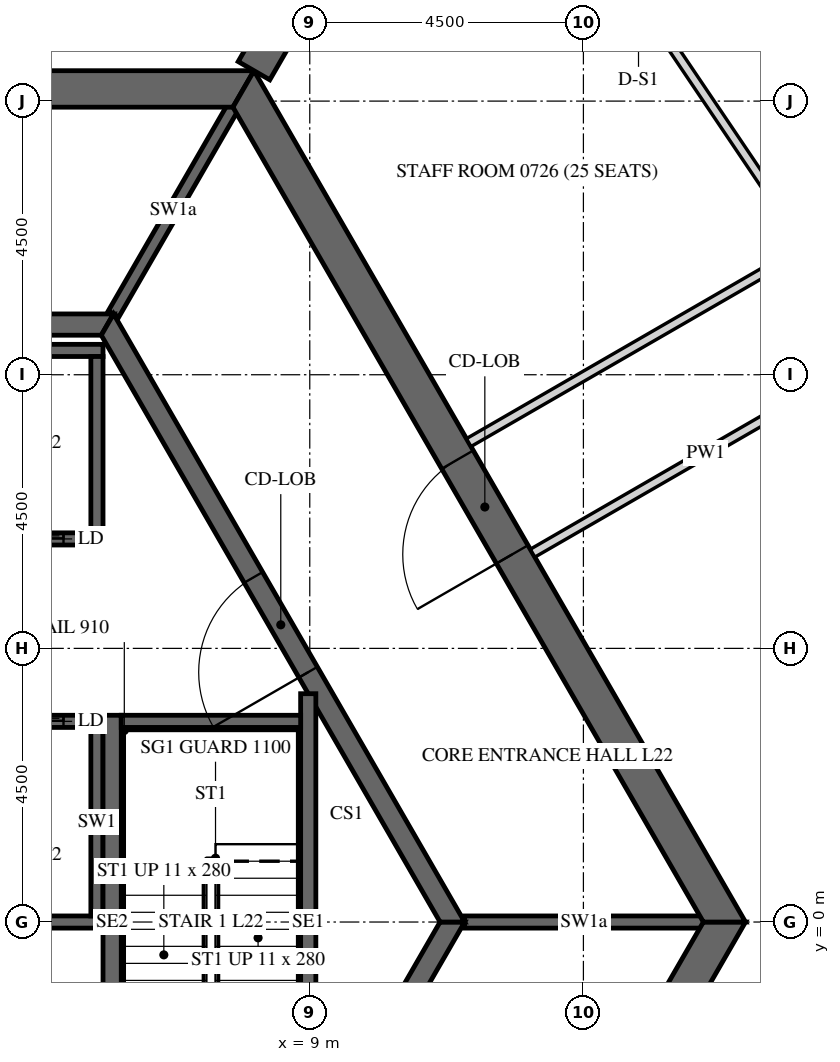
"""IFC4 building model, lengths in metres.
Left out: names, types, materials, properties, quantities, classifications, styles, units other than length and angle.
Written with IfcOpenShell. Run it as: python <this file> out.ifc"""

import sys

from ifc_helpers import new_model, si_unit, direction, frame, frame_2d, origin, place, context, subcontext, project, spatial, polyline, rectangle, outline, extrude, element, fill, save


model = new_model("IFC4")
c1 = context("Model", 3, precision=1e-05, world=origin(), true_north=direction((0.0, 1.0)))
c2 = subcontext(c1, "Body", "Model", "MODEL_VIEW")
j1 = project(units=[si_unit("LENGTHUNIT", "METRE"), si_unit("PLANEANGLEUNIT", "RADIAN")], contexts=[c1])
p1 = place(None, origin())
s1 = spatial("IfcSite", under=j1, at=p1, CompositionType="ELEMENT")
p2 = place(p1, origin())
s2 = spatial("IfcBuilding", under=s1, at=p2, CompositionType="ELEMENT")
p3 = place(p2, frame((0.0, 0.0, 99.9)))
s3 = spatial("IfcBuildingStorey", under=s2, at=p3, CompositionType="ELEMENT", Elevation=99.9)
p4 = place(p3, frame((7.91, -13.7, -0.15), z_axis=(0.0, 0.0, 1.0), x_axis=(0.499999880136, 0.866025472988, 0.0)))
e1 = element("IfcWall", 1, at=p4, inside=s3, PredefinedType="SHEAR", context=c2, shape_type="SweptSolid", body=[
    extrude(outline(polyline([(-0.173, -0.3), (15.993, -0.3), (15.646, 0.3), (0.173, 0.3), (-0.173, -0.3)])), origin(), (0.0, 0.0, 1.0), 3.9),
])
p5 = place(p4, frame((7.039, 0.0, 0.15)))
e2 = element("IfcOpeningElement", 2, at=p5, cuts=e1, PredefinedType="OPENING", context=c2, shape_type="SweptSolid", body=[
    extrude(rectangle(XDim=1.8, YDim=2.4, at=frame_2d((0.9, 1.2))), frame((0.0, 0.31, 0.0), z_axis=(0.0, -1.0, 0.0), x_axis=(1.0, 0.0, 0.0)), (0.0, 0.0, 1.0), 0.62),
])
p6 = place(p3, frame((15.819, 0.0, -0.15), z_axis=(0.0, 0.0, 1.0), x_axis=(-0.499999880136, 0.866025472988, 0.0)))
e3 = element("IfcWall", 3, at=p6, inside=s3, PredefinedType="SHEAR", context=c2, shape_type="SweptSolid", body=[
    extrude(outline(polyline([(-0.173, -0.3), (15.993, -0.3), (15.646, 0.3), (0.173, 0.3), (-0.173, -0.3)])), origin(), (0.0, 0.0, 1.0), 3.9),
])
p7 = place(p6, frame((6.981, 0.0, 0.15)))
e4 = element("IfcOpeningElement", 4, at=p7, cuts=e3, PredefinedType="OPENING", context=c2, shape_type="SweptSolid", body=[
    extrude(rectangle(XDim=1.8, YDim=2.4, at=frame_2d((0.9, 1.2))), frame((0.0, 0.31, 0.0), z_axis=(0.0, -1.0, 0.0), x_axis=(1.0, 0.0, 0.0)), (0.0, 0.0, 1.0), 0.62),
])
p8 = place(p3, frame((7.91, 13.7, -0.15), z_axis=(0.0, 0.0, 1.0), x_axis=(-1.0, 0.0, 0.0)))
e5 = element("IfcWall", 5, at=p8, inside=s3, PredefinedType="SHEAR", context=c2, shape_type="SweptSolid", body=[
    extrude(outline(polyline([(-0.173, -0.3), (15.993, -0.3), (15.646, 0.3), (0.173, 0.3), (-0.173, -0.3)])), origin(), (0.0, 0.0, 1.0), 3.9),
])
p9 = place(p8, frame((7.31, 0.0, 0.15)))
e6 = element("IfcOpeningElement", 6, at=p9, cuts=e5, PredefinedType="OPENING", context=c2, shape_type="SweptSolid", body=[
    extrude(rectangle(XDim=1.2, YDim=2.4, at=frame_2d((0.6, 1.2))), frame((0.0, 0.31, 0.0), z_axis=(0.0, -1.0, 0.0), x_axis=(1.0, 0.0, 0.0)), (0.0, 0.0, 1.0), 0.62),
])
p10 = place(p3, frame((8.083, 14.0, -0.15), z_axis=(0.0, 0.0, 1.0), x_axis=(0.499997680643, 0.866026742862, 0.0)))
e7 = element("IfcWall", 7, at=p10, inside=s3, PredefinedType="SHEAR", context=c2, shape_type="SweptSolid", body=[
    extrude(rectangle(XDim=16.509, YDim=0.6, at=frame_2d((8.254, 0.0))), origin(), (0.0, 0.0, 1.0), 3.9),
])
p11 = place(p10, frame((7.354, 0.0, 0.15)))
e8 = element("IfcOpeningElement", 8, at=p11, cuts=e7, PredefinedType="OPENING", context=c2, shape_type="SweptSolid", body=[
    extrude(rectangle(XDim=1.8, YDim=2.4, at=frame_2d((0.9, 1.2))), frame((0.0, 0.31, 0.0), z_axis=(0.0, -1.0, 0.0), x_axis=(1.0, 0.0, 0.0)), (0.0, 0.0, 1.0), 0.62),
])
p12 = place(p3, frame((5.673, -9.825, -0.15), z_axis=(0.0, 0.0, 1.0), x_axis=(0.499995046907, 0.866028263435, 0.0)))
e9 = element("IfcWall", 9, at=p12, inside=s3, PredefinedType="SHEAR", context=c2, shape_type="SweptSolid", body=[
    extrude(outline(polyline([(-0.101, -0.175), (11.446, -0.175), (11.244, 0.175), (0.101, 0.175), (-0.101, -0.175)])), origin(), (0.0, 0.0, 1.0), 3.9),
])
p13 = place(p12, frame((4.801, 0.0, 0.15)))
e10 = element("IfcOpeningElement", 10, at=p13, cuts=e9, PredefinedType="OPENING", context=c2, shape_type="SweptSolid", body=[
    extrude(rectangle(XDim=1.8, YDim=2.4, at=frame_2d((0.9, 1.2))), frame((0.0, 0.185, 0.0), z_axis=(0.0, -1.0, 0.0), x_axis=(1.0, 0.0, 0.0)), (0.0, 0.0, 1.0), 0.37),
])
p14 = place(p3, frame((11.345, 0.0, -0.15), z_axis=(0.0, 0.0, 1.0), x_axis=(-0.499995046907, 0.866028263435, 0.0)))
e11 = element("IfcWall", 11, at=p14, inside=s3, PredefinedType="SHEAR", context=c2, shape_type="SweptSolid", body=[
    extrude(outline(polyline([(-0.101, -0.175), (11.446, -0.175), (11.244, 0.175), (0.101, 0.175), (-0.101, -0.175)])), origin(), (0.0, 0.0, 1.0), 3.9),
])
p15 = place(p14, frame((4.744, 0.0, 0.15)))
e12 = element("IfcOpeningElement", 12, at=p15, cuts=e11, PredefinedType="OPENING", context=c2, shape_type="SweptSolid", body=[
    extrude(rectangle(XDim=1.8, YDim=2.4, at=frame_2d((0.9, 1.2))), frame((0.0, 0.185, 0.0), z_axis=(0.0, -1.0, 0.0), x_axis=(1.0, 0.0, 0.0)), (0.0, 0.0, 1.0), 0.37),
])
p16 = place(p3, frame((5.673, 9.825, -0.15), z_axis=(0.0, 0.0, 1.0), x_axis=(-1.0, 0.0, 0.0)))
e13 = element("IfcWall", 13, at=p16, inside=s3, PredefinedType="SHEAR", context=c2, shape_type="SweptSolid", body=[
    extrude(outline(polyline([(-0.101, -0.175), (11.446, -0.175), (11.244, 0.175), (0.101, 0.175), (-0.101, -0.175)])), origin(), (0.0, 0.0, 1.0), 3.9),
])
p17 = place(p3, frame((-5.6, 6.3, -0.25), z_axis=(0.0, 0.0, 1.0), x_axis=(1.0, 0.0, 0.0)))
e14 = element("IfcWall", 14, at=p17, inside=s3, PredefinedType="SHEAR", context=c2, shape_type="SweptSolid", body=[
    extrude(rectangle(XDim=11.2, YDim=0.2, at=frame_2d((5.6, 0.0))), origin(), (0.0, 0.0, 1.0), 3.9),
])
p18 = place(p17, frame((0.65, 0.0, 0.25)))
e15 = element("IfcOpeningElement", 15, at=p18, cuts=e14, PredefinedType="OPENING", context=c2, shape_type="SweptSolid", body=[
    extrude(rectangle(XDim=1.1, YDim=2.1, at=frame_2d((0.55, 1.05))), frame((0.0, 0.11, 0.0), z_axis=(0.0, -1.0, 0.0), x_axis=(1.0, 0.0, 0.0)), (0.0, 0.0, 1.0), 0.22),
])
p19 = place(p17, frame((2.85, 0.0, 0.25)))
e16 = element("IfcOpeningElement", 16, at=p19, cuts=e14, PredefinedType="OPENING", context=c2, shape_type="SweptSolid", body=[
    extrude(rectangle(XDim=1.1, YDim=2.1, at=frame_2d((0.55, 1.05))), frame((0.0, 0.11, 0.0), z_axis=(0.0, -1.0, 0.0), x_axis=(1.0, 0.0, 0.0)), (0.0, 0.0, 1.0), 0.22),
])
p20 = place(p17, frame((5.05, 0.0, 0.25)))
e17 = element("IfcOpeningElement", 17, at=p20, cuts=e14, PredefinedType="OPENING", context=c2, shape_type="SweptSolid", body=[
    extrude(rectangle(XDim=1.1, YDim=2.1, at=frame_2d((0.55, 1.05))), frame((0.0, 0.11, 0.0), z_axis=(0.0, -1.0, 0.0), x_axis=(1.0, 0.0, 0.0)), (0.0, 0.0, 1.0), 0.22),
])
p21 = place(p17, frame((7.25, 0.0, 0.25)))
e18 = element("IfcOpeningElement", 18, at=p21, cuts=e14, PredefinedType="OPENING", context=c2, shape_type="SweptSolid", body=[
    extrude(rectangle(XDim=1.1, YDim=2.1, at=frame_2d((0.55, 1.05))), frame((0.0, 0.11, 0.0), z_axis=(0.0, -1.0, 0.0), x_axis=(1.0, 0.0, 0.0)), (0.0, 0.0, 1.0), 0.22),
])
p22 = place(p17, frame((9.45, 0.0, 0.25)))
e19 = element("IfcOpeningElement", 19, at=p22, cuts=e14, PredefinedType="OPENING", context=c2, shape_type="SweptSolid", body=[
    extrude(rectangle(XDim=1.1, YDim=2.1, at=frame_2d((0.55, 1.05))), frame((0.0, 0.11, 0.0), z_axis=(0.0, -1.0, 0.0), x_axis=(1.0, 0.0, 0.0)), (0.0, 0.0, 1.0), 0.22),
])
p23 = place(p3, frame((-5.6, 9.4, -0.25), z_axis=(0.0, 0.0, 1.0), x_axis=(1.0, 0.0, 0.0)))
e20 = element("IfcWall", 20, at=p23, inside=s3, PredefinedType="SHEAR", context=c2, shape_type="SweptSolid", body=[
    extrude(rectangle(XDim=11.2, YDim=0.2, at=frame_2d((5.6, 0.0))), origin(), (0.0, 0.0, 1.0), 3.9),
])
p24 = place(p3, frame((5.5, 6.4, -0.25), z_axis=(0.0, 0.0, 1.0), x_axis=(0.0, 1.0, 0.0)))
e21 = element("IfcWall", 21, at=p24, inside=s3, PredefinedType="SHEAR", context=c2, shape_type="SweptSolid", body=[
    extrude(rectangle(XDim=2.9, YDim=0.2, at=frame_2d((1.45, 0.0))), origin(), (0.0, 0.0, 1.0), 3.9),
])
p25 = place(p3, frame((-5.6, 3.3, -0.25), z_axis=(0.0, 0.0, 1.0), x_axis=(1.0, 0.0, 0.0)))
e22 = element("IfcWall", 22, at=p25, inside=s3, PredefinedType="SHEAR", context=c2, shape_type="SweptSolid", body=[
    extrude(rectangle(XDim=11.2, YDim=0.2, at=frame_2d((5.6, 0.0))), origin(), (0.0, 0.0, 1.0), 3.9),
])
p26 = place(p25, frame((0.65, 0.0, 0.25)))
e23 = element("IfcOpeningElement", 23, at=p26, cuts=e22, PredefinedType="OPENING", context=c2, shape_type="SweptSolid", body=[
    extrude(rectangle(XDim=1.1, YDim=2.1, at=frame_2d((0.55, 1.05))), frame((0.0, 0.11, 0.0), z_axis=(0.0, -1.0, 0.0), x_axis=(1.0, 0.0, 0.0)), (0.0, 0.0, 1.0), 0.22),
])
p27 = place(p25, frame((2.85, 0.0, 0.25)))
e24 = element("IfcOpeningElement", 24, at=p27, cuts=e22, PredefinedType="OPENING", context=c2, shape_type="SweptSolid", body=[
    extrude(rectangle(XDim=1.1, YDim=2.1, at=frame_2d((0.55, 1.05))), frame((0.0, 0.11, 0.0), z_axis=(0.0, -1.0, 0.0), x_axis=(1.0, 0.0, 0.0)), (0.0, 0.0, 1.0), 0.22),
])
p28 = place(p25, frame((5.05, 0.0, 0.25)))
e25 = element("IfcOpeningElement", 25, at=p28, cuts=e22, PredefinedType="OPENING", context=c2, shape_type="SweptSolid", body=[
    extrude(rectangle(XDim=1.1, YDim=2.1, at=frame_2d((0.55, 1.05))), frame((0.0, 0.11, 0.0), z_axis=(0.0, -1.0, 0.0), x_axis=(1.0, 0.0, 0.0)), (0.0, 0.0, 1.0), 0.22),
])
p29 = place(p25, frame((7.25, 0.0, 0.25)))
e26 = element("IfcOpeningElement", 26, at=p29, cuts=e22, PredefinedType="OPENING", context=c2, shape_type="SweptSolid", body=[
    extrude(rectangle(XDim=1.1, YDim=2.1, at=frame_2d((0.55, 1.05))), frame((0.0, 0.11, 0.0), z_axis=(0.0, -1.0, 0.0), x_axis=(1.0, 0.0, 0.0)), (0.0, 0.0, 1.0), 0.22),
])
p30 = place(p25, frame((9.45, 0.0, 0.25)))
e27 = element("IfcOpeningElement", 27, at=p30, cuts=e22, PredefinedType="OPENING", context=c2, shape_type="SweptSolid", body=[
    extrude(rectangle(XDim=1.1, YDim=2.1, at=frame_2d((0.55, 1.05))), frame((0.0, 0.11, 0.0), z_axis=(0.0, -1.0, 0.0), x_axis=(1.0, 0.0, 0.0)), (0.0, 0.0, 1.0), 0.22),
])
p31 = place(p3, frame((-5.6, 0.0, -0.25), z_axis=(0.0, 0.0, 1.0), x_axis=(1.0, 0.0, 0.0)))
e28 = element("IfcWall", 28, at=p31, inside=s3, PredefinedType="SHEAR", context=c2, shape_type="SweptSolid", body=[
    extrude(rectangle(XDim=11.2, YDim=0.2, at=frame_2d((5.6, 0.0))), origin(), (0.0, 0.0, 1.0), 3.9),
])
p32 = place(p3, frame((5.5, 0.1, -0.25), z_axis=(0.0, 0.0, 1.0), x_axis=(0.0, 1.0, 0.0)))
e29 = element("IfcWall", 29, at=p32, inside=s3, PredefinedType="SHEAR", context=c2, shape_type="SweptSolid", body=[
    extrude(rectangle(XDim=3.1, YDim=0.2, at=frame_2d((1.55, 0.0))), origin(), (0.0, 0.0, 1.0), 3.9),
])
p33 = place(p3, frame((11.547, 0.0, -0.15), z_axis=(0.0, 0.0, 1.0), x_axis=(1.0, 0.0, 0.0)))
e30 = element("IfcWall", 30, at=p33, inside=s3, PredefinedType="SHEAR", context=c2, shape_type="SweptSolid", body=[
    extrude(rectangle(XDim=3.926, YDim=0.2, at=frame_2d((1.963, 0.0))), origin(), (0.0, 0.0, 1.0), 3.9),
])
p34 = place(p3, frame((5.773, 10.0, -0.15), z_axis=(0.0, 0.0, 1.0), x_axis=(0.500038251005, 0.86600331843, 0.0)))
e31 = element("IfcWall", 31, at=p34, inside=s3, PredefinedType="SHEAR", context=c2, shape_type="SweptSolid", body=[
    extrude(rectangle(XDim=3.926, YDim=0.2, at=frame_2d((1.963, 0.0))), origin(), (0.0, 0.0, 1.0), 3.9),
])
p35 = place(p3, frame((5.75, -3.4, -0.25), z_axis=(0.0, 0.0, 1.0), x_axis=(0.0, 1.0, 0.0)))
e32 = element("IfcWall", 32, at=p35, inside=s3, PredefinedType="SHEAR", context=c2, shape_type="SweptSolid", body=[
    extrude(rectangle(XDim=6.8, YDim=0.3, at=frame_2d((3.4, 0.0))), origin(), (0.0, 0.0, 1.0), 3.9),
])
p36 = place(p3, frame((8.975, -3.755, -0.25), z_axis=(0.0, 0.0, 1.0), x_axis=(0.0, 1.0, 0.0)))
e33 = element("IfcWall", 33, at=p36, inside=s3, PredefinedType="SHEAR", context=c2, shape_type="SweptSolid", body=[
    extrude(rectangle(XDim=7.51, YDim=0.25, at=frame_2d((3.755, 0.0))), origin(), (0.0, 0.0, 1.0), 3.9),
])
p37 = place(p3, frame((5.9, 3.3, -0.25), z_axis=(0.0, 0.0, 1.0), x_axis=(1.0, 0.0, 0.0)))
e34 = element("IfcWall", 34, at=p37, inside=s3, PredefinedType="SHEAR", context=c2, shape_type="SweptSolid", body=[
    extrude(rectangle(XDim=2.95, YDim=0.2, at=frame_2d((1.475, 0.0))), origin(), (0.0, 0.0, 1.0), 3.9),
])
p38 = place(p3, frame((14.102, -20.075, 0.0), z_axis=(0.0, 0.0, 1.0), x_axis=(0.499996816197, 0.866027241946, 0.0)))
e35 = element("IfcWall", 35, at=p38, inside=s3, PredefinedType="PARTITIONING", context=c2, shape_type="SweptSolid", body=[
    extrude(rectangle(XDim=24.238, YDim=0.15, at=frame_2d((12.119, 0.0))), origin(), (0.0, 0.0, 1.0), 2.988),
])
p39 = place(p38, frame((4.729, 0.0, 0.0)))
e36 = element("IfcOpeningElement", 36, at=p39, cuts=e35, PredefinedType="OPENING", context=c2, shape_type="SweptSolid", body=[
    extrude(rectangle(XDim=1.0, YDim=2.1, at=frame_2d((0.5, 1.05))), frame((0.0, 0.085, 0.0), z_axis=(0.0, -1.0, 0.0), x_axis=(1.0, 0.0, 0.0)), (0.0, 0.0, 1.0), 0.17),
])
p40 = place(p38, frame((15.946, 0.0, 0.0)))
e37 = element("IfcOpeningElement", 37, at=p40, cuts=e35, PredefinedType="OPENING", context=c2, shape_type="SweptSolid", body=[
    extrude(rectangle(XDim=1.0, YDim=2.1, at=frame_2d((0.5, 1.05))), frame((0.0, 0.085, 0.0), z_axis=(0.0, -1.0, 0.0), x_axis=(1.0, 0.0, 0.0)), (0.0, 0.0, 1.0), 0.17),
])
p41 = place(p3, frame((26.174, 0.985, 0.0), z_axis=(0.0, 0.0, 1.0), x_axis=(-0.559192163771, 0.829038071488, 0.0)))
e38 = element("IfcWall", 38, at=p41, inside=s3, PredefinedType="PARTITIONING", context=c2, shape_type="SweptSolid", body=[
    extrude(rectangle(XDim=22.335, YDim=0.15, at=frame_2d((11.168, 0.0))), origin(), (0.0, 0.0, 1.0), 2.988),
])
p42 = place(p41, frame((3.463, 0.0, 0.0)))
e39 = element("IfcOpeningElement", 39, at=p42, cuts=e38, PredefinedType="OPENING", context=c2, shape_type="SweptSolid", body=[
    extrude(rectangle(XDim=1.0, YDim=2.1, at=frame_2d((0.5, 1.05))), frame((0.0, 0.085, 0.0), z_axis=(0.0, -1.0, 0.0), x_axis=(1.0, 0.0, 0.0)), (0.0, 0.0, 1.0), 0.17),
])
p43 = place(p41, frame((13.309, 0.0, 0.0)))
e40 = element("IfcOpeningElement", 40, at=p43, cuts=e38, PredefinedType="OPENING", context=c2, shape_type="SweptSolid", body=[
    extrude(rectangle(XDim=1.0, YDim=2.1, at=frame_2d((0.5, 1.05))), frame((0.0, 0.085, 0.0), z_axis=(0.0, -1.0, 0.0), x_axis=(1.0, 0.0, 0.0)), (0.0, 0.0, 1.0), 0.17),
])
p44 = place(p3, frame((12.664, 6.066, 0.0), z_axis=(0.0, 0.0, 1.0), x_axis=(0.866027295802, 0.499996722915, 0.0)))
e41 = element("IfcWall", 41, at=p44, inside=s3, PredefinedType="PARTITIONING", context=c2, shape_type="SweptSolid", body=[
    extrude(rectangle(XDim=6.575, YDim=0.15, at=frame_2d((3.288, 0.0))), origin(), (0.0, 0.0, 1.0), 2.988),
])
p45 = place(p3, frame((11.632, 19.326, 0.0), z_axis=(0.0, 0.0, 1.0), x_axis=(0.559193968377, -0.829036854266, 0.0)))
e42 = element("IfcWall", 42, at=p45, inside=s3, PredefinedType="PARTITIONING", context=c2, shape_type="SweptSolid", body=[
    extrude(rectangle(XDim=9.924, YDim=0.15, at=frame_2d((4.962, 0.0))), origin(), (0.0, 0.0, 1.0), 2.988),
])
p46 = place(p45, frame((4.512, 0.0, 0.0)))
e43 = element("IfcOpeningElement", 43, at=p46, cuts=e42, PredefinedType="OPENING", context=c2, shape_type="SweptSolid", body=[
    extrude(rectangle(XDim=0.9, YDim=2.1, at=frame_2d((0.45, 1.05))), frame((0.0, 0.085, 0.0), z_axis=(0.0, -1.0, 0.0), x_axis=(1.0, 0.0, 0.0)), (0.0, 0.0, 1.0), 0.17),
])
p47 = place(p3, frame((17.116, 11.061, 0.0), z_axis=(0.0, 0.0, 1.0), x_axis=(-0.866021127751, -0.500007406234, 0.0)))
e44 = element("IfcWall", 44, at=p47, inside=s3, PredefinedType="PARTITIONING", context=c2, shape_type="SweptSolid", body=[
    extrude(rectangle(XDim=6.354, YDim=0.15, at=frame_2d((3.177, 0.0))), origin(), (0.0, 0.0, 1.0), 2.988),
])
p48 = place(p7, origin())
e45 = element("IfcDoor", 45, at=p48, inside=s3, OperationType="DOUBLE_DOOR_SINGLE_SWING", PredefinedType="DOOR", context=c2, shape_type="SweptSolid", body=[
    extrude(rectangle(XDim=1.8, YDim=2.4, at=frame_2d((0.9, 1.2))), frame((0.0, 0.025, 0.0), z_axis=(0.0, -1.0, 0.0), x_axis=(1.0, 0.0, 0.0)), (0.0, 0.0, 1.0), 0.05),
])
fill(e4, e45)
p49 = place(p15, origin())
e46 = element("IfcDoor", 46, at=p49, inside=s3, OperationType="DOUBLE_DOOR_SINGLE_SWING", PredefinedType="DOOR", context=c2, shape_type="SweptSolid", body=[
    extrude(rectangle(XDim=1.8, YDim=2.4, at=frame_2d((0.9, 1.2))), frame((0.0, 0.025, 0.0), z_axis=(0.0, -1.0, 0.0), x_axis=(1.0, 0.0, 0.0)), (0.0, 0.0, 1.0), 0.05),
])
fill(e12, e46)
p50 = place(p22, origin())
e47 = element("IfcDoor", 47, at=p50, inside=s3, OperationType="SLIDING_TO_LEFT", PredefinedType="DOOR", context=c2, shape_type="SweptSolid", body=[
    extrude(rectangle(XDim=1.1, YDim=2.1, at=frame_2d((0.55, 1.05))), frame((0.0, 0.025, 0.0), z_axis=(0.0, -1.0, 0.0), x_axis=(1.0, 0.0, 0.0)), (0.0, 0.0, 1.0), 0.05),
])
fill(e19, e47)
p51 = place(p30, origin())
e48 = element("IfcDoor", 48, at=p51, inside=s3, OperationType="SLIDING_TO_LEFT", PredefinedType="DOOR", context=c2, shape_type="SweptSolid", body=[
    extrude(rectangle(XDim=1.1, YDim=2.1, at=frame_2d((0.55, 1.05))), frame((0.0, 0.025, 0.0), z_axis=(0.0, -1.0, 0.0), x_axis=(1.0, 0.0, 0.0)), (0.0, 0.0, 1.0), 0.05),
])
fill(e27, e48)
save(model, sys.argv[1])
